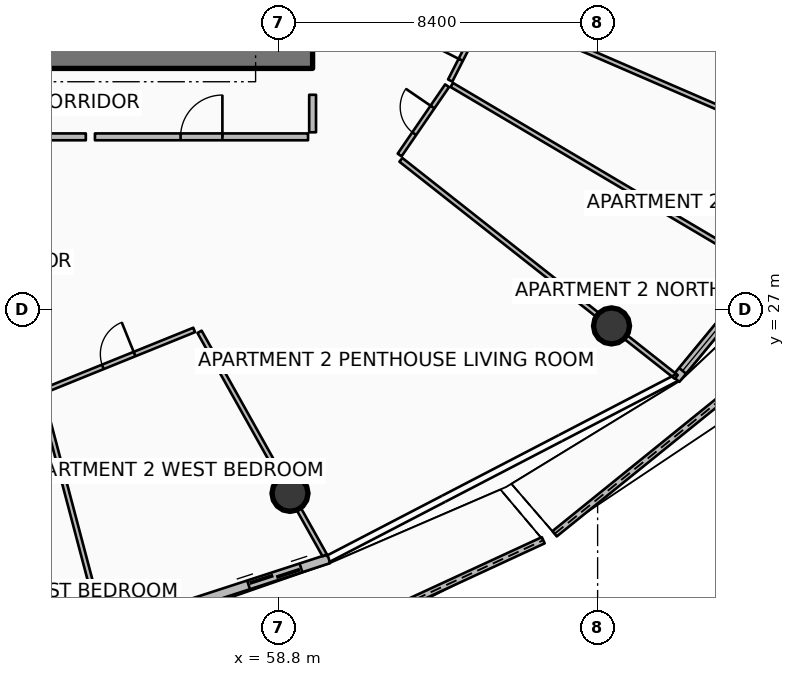
"""IFC4 building model, lengths in metres.
Left out: names, types, materials, properties, quantities, classifications, styles, units other than length and angle.
Written with IfcOpenShell. Run it as: python <this file> out.ifc"""

import sys

from ifc_helpers import new_model, si_unit, direction, frame, frame_2d, origin, origin_2d, place, context, subcontext, project, spatial, polyline, rectangle, circle, outline, extrude, element, fill, save


model = new_model("IFC4")
c1 = context("Model", 3, precision=1e-05, world=origin(), true_north=direction((0.0, 1.0)))
c2 = subcontext(c1, "Body", "Model", "MODEL_VIEW")
j1 = project(units=[si_unit("LENGTHUNIT", "METRE"), si_unit("PLANEANGLEUNIT", "RADIAN")], contexts=[c1])
p1 = place(None, origin())
s1 = spatial("IfcSite", under=j1, at=p1, CompositionType="ELEMENT")
p2 = place(p1, origin())
s2 = spatial("IfcBuilding", under=s1, at=p2, CompositionType="ELEMENT")
p3 = place(p2, frame((0.0, 0.0, 267.5)))
s3 = spatial("IfcBuildingStorey", under=s2, at=p3, CompositionType="ELEMENT", Elevation=267.5)
p4 = place(p3, frame((49.95, 33.675, 0.0), z_axis=(0.0, 0.0, 1.0), x_axis=(1.0, 0.0, 0.0)))
e1 = element("IfcWall", 1, at=p4, inside=s3, PredefinedType="SHEAR", context=c2, shape_type="SweptSolid", body=[
    extrude(rectangle(XDim=9.75, YDim=0.65, at=frame_2d((4.875, 0.0))), origin(), (0.0, 0.0, 1.0), 3.85),
])
for number, where, z_axis, x_axis in (
    (2, (59.105, 22.17, 0.0), (0.0, 0.0, 1.0), (1.0, 0.0, 0.0)),
    (3, (67.566, 26.575, 0.0), (0.0, 0.0, 1.0), (1.0, 0.0, 0.0)),
):
    element("IfcColumn", number, at=place(p3, frame(where, z_axis=z_axis, x_axis=x_axis)), inside=s3, PredefinedType="COLUMN", context=c2, shape_type="SweptSolid", body=[
        extrude(circle(Radius=0.475, at=origin_2d()), origin(), (0.0, 0.0, 1.0), 3.59),
    ])
p5 = place(p3, frame((56.379, 16.598, 0.0), z_axis=(0.0, 0.0, 1.0), x_axis=(0.907848132744, 0.419299138888, 0.0)))
e4 = element("IfcWall", 4, at=p5, inside=s3, PredefinedType="PARAPET", context=c2, shape_type="SweptSolid", body=[
    extrude(outline(polyline([(0.0, 0.0), (10.344, 0.0), (10.344, 1.233), (5.172, 1.418), (0.0, 1.632), (0.0, 0.0)])), frame((0.0, 0.09, 0.0), z_axis=(0.0, -1.0, 0.0), x_axis=(1.0, 0.0, 0.0)), (0.0, 0.0, 1.0), 0.18),
])
p6 = place(p3, frame((66.067, 21.105, 0.0), z_axis=(0.0, 0.0, 1.0), x_axis=(0.777688536298, 0.628649775718, 0.0)))
e5 = element("IfcWall", 5, at=p6, inside=s3, PredefinedType="PARAPET", context=c2, shape_type="SweptSolid", body=[
    extrude(outline(polyline([(0.0, 0.0), (11.285, 0.0), (11.285, 1.148), (5.642, 1.127), (0.0, 1.224), (0.0, 0.0)])), frame((0.0, 0.09, 0.0), z_axis=(0.0, -1.0, 0.0), x_axis=(1.0, 0.0, 0.0)), (0.0, 0.0, 1.0), 0.18),
])
p7 = place(p3, frame((50.858, 17.436, 0.0), z_axis=(0.0, 0.0, 1.0), x_axis=(0.951055974609, 0.309018661507, 0.0)))
e6 = element("IfcWall", 6, at=p7, inside=s3, PredefinedType="SOLIDWALL", context=c2, shape_type="SweptSolid", body=[
    extrude(rectangle(XDim=9.745, YDim=0.24, at=frame_2d((4.873, 0.0))), origin(), (0.0, 0.0, 1.0), 2.54),
])
p8 = place(p7, frame((7.525, 0.0, 0.0)))
e7 = element("IfcOpeningElement", 7, at=p8, cuts=e6, PredefinedType="OPENING", context=c2, shape_type="SweptSolid", body=[
    extrude(rectangle(XDim=1.45, YDim=2.15, at=frame_2d((0.725, 1.075))), frame((0.0, 0.13, 0.0), z_axis=(0.0, -1.0, 0.0), x_axis=(1.0, 0.0, 0.0)), (0.0, 0.0, 1.0), 0.26),
])
p9 = place(p7, frame((0.28, 0.0, 0.65)))
e8 = element("IfcOpeningElement", 8, at=p9, cuts=e6, PredefinedType="OPENING", context=c2, shape_type="SweptSolid", body=[
    extrude(rectangle(XDim=1.6, YDim=1.5, at=frame_2d((0.8, 0.75))), frame((0.0, 0.13, 0.0), z_axis=(0.0, -1.0, 0.0), x_axis=(1.0, 0.0, 0.0)), (0.0, 0.0, 1.0), 0.26),
])
p10 = place(p3, frame((69.258, 25.178, 0.0), z_axis=(0.0, 0.0, 1.0), x_axis=(0.636680093065, 0.771128043255, 0.0)))
e9 = element("IfcWall", 9, at=p10, inside=s3, PredefinedType="SOLIDWALL", context=c2, shape_type="SweptSolid", body=[
    extrude(rectangle(XDim=11.438, YDim=0.24, at=frame_2d((5.719, 0.0))), origin(), (0.0, 0.0, 1.0), 2.54),
])
p11 = place(p10, frame((9.218, 0.0, 0.0)))
e10 = element("IfcOpeningElement", 10, at=p11, cuts=e9, PredefinedType="OPENING", context=c2, shape_type="SweptSolid", body=[
    extrude(rectangle(XDim=1.45, YDim=2.15, at=frame_2d((0.725, 1.075))), frame((0.0, 0.13, 0.0), z_axis=(0.0, -1.0, 0.0), x_axis=(1.0, 0.0, 0.0)), (0.0, 0.0, 1.0), 0.26),
])
p12 = place(p10, frame((0.28, 0.0, 0.65)))
e11 = element("IfcOpeningElement", 11, at=p12, cuts=e9, PredefinedType="OPENING", context=c2, shape_type="SweptSolid", body=[
    extrude(rectangle(XDim=1.6, YDim=1.5, at=frame_2d((0.8, 0.75))), frame((0.0, 0.13, 0.0), z_axis=(0.0, -1.0, 0.0), x_axis=(1.0, 0.0, 0.0)), (0.0, 0.0, 1.0), 0.26),
])
p13 = place(p3, frame((53.972, 31.55, 0.0), z_axis=(0.0, 0.0, 1.0), x_axis=(1.0, 0.0, 0.0)))
e12 = element("IfcWall", 12, at=p13, inside=s3, PredefinedType="PARTITIONING", context=c2, shape_type="SweptSolid", body=[
    extrude(rectangle(XDim=5.608, YDim=0.18, at=frame_2d((2.804, 0.0))), origin(), (0.0, 0.0, 1.0), 2.957),
])
p14 = place(p13, frame((2.254, 0.0, 0.0)))
e13 = element("IfcOpeningElement", 13, at=p14, cuts=e12, PredefinedType="OPENING", context=c2, shape_type="SweptSolid", body=[
    extrude(rectangle(XDim=1.1, YDim=2.1, at=frame_2d((0.55, 1.05))), frame((0.0, 0.1, 0.0), z_axis=(0.0, -1.0, 0.0), x_axis=(1.0, 0.0, 0.0)), (0.0, 0.0, 1.0), 0.2),
])
p15 = place(p3, frame((59.7, 31.67, 0.0), z_axis=(0.0, 0.0, 1.0), x_axis=(0.0, 1.0, 0.0)))
e14 = element("IfcWall", 14, at=p15, inside=s3, PredefinedType="PARTITIONING", context=c2, shape_type="SweptSolid", body=[
    extrude(rectangle(XDim=0.987, YDim=0.18, at=frame_2d((0.493, 0.0))), origin(), (0.0, 0.0, 1.0), 2.957),
])
p16 = place(p3, frame((49.357, 31.55, 0.0), z_axis=(0.0, 0.0, 1.0), x_axis=(1.0, 0.0, 0.0)))
e15 = element("IfcWall", 15, at=p16, inside=s3, PredefinedType="PARTITIONING", context=c2, shape_type="SweptSolid", body=[
    extrude(rectangle(XDim=4.376, YDim=0.18, at=frame_2d((2.188, 0.0))), origin(), (0.0, 0.0, 1.0), 2.957),
])
p17 = place(p3, frame((56.725, 26.42, 0.0), z_axis=(0.0, 0.0, 1.0), x_axis=(0.488624332812, -0.872494275846, 0.0)))
e16 = element("IfcWall", 16, at=p17, inside=s3, PredefinedType="PARTITIONING", context=c2, shape_type="SweptSolid", body=[
    extrude(rectangle(XDim=6.738, YDim=0.125, at=frame_2d((3.369, 0.0))), origin(), (0.0, 0.0, 1.0), 2.957),
])
p18 = place(p3, frame((52.56, 24.746, 0.0), z_axis=(0.0, 0.0, 1.0), x_axis=(0.255531000294, -0.966800862582, 0.0)))
e17 = element("IfcWall", 17, at=p18, inside=s3, PredefinedType="PARTITIONING", context=c2, shape_type="SweptSolid", body=[
    extrude(rectangle(XDim=6.311, YDim=0.125, at=frame_2d((3.155, 0.0))), origin(), (0.0, 0.0, 1.0), 3.03),
])
p19 = place(p3, frame((52.612, 24.863, 0.0), z_axis=(0.0, 0.0, 1.0), x_axis=(0.927015680649, 0.375022569762, 0.0)))
e18 = element("IfcWall", 18, at=p19, inside=s3, PredefinedType="PARTITIONING", context=c2, shape_type="SweptSolid", body=[
    extrude(rectangle(XDim=4.285, YDim=0.125, at=frame_2d((2.143, 0.0))), origin(), (0.0, 0.0, 1.0), 2.957),
])
p20 = place(p19, frame((1.692, 0.0, 0.0)))
e19 = element("IfcOpeningElement", 19, at=p20, cuts=e18, PredefinedType="OPENING", context=c2, shape_type="SweptSolid", body=[
    extrude(rectangle(XDim=0.9, YDim=2.08, at=frame_2d((0.45, 1.04))), frame((0.0, 0.073, 0.0), z_axis=(0.0, -1.0, 0.0), x_axis=(1.0, 0.0, 0.0)), (0.0, 0.0, 1.0), 0.145),
])
p21 = place(p3, frame((62.023, 30.945, 0.0), z_axis=(0.0, 0.0, 1.0), x_axis=(0.785322102606, -0.619087388952, 0.0)))
e20 = element("IfcWall", 20, at=p21, inside=s3, PredefinedType="PARTITIONING", context=c2, shape_type="SweptSolid", body=[
    extrude(rectangle(XDim=9.228, YDim=0.125, at=frame_2d((4.614, 0.0))), origin(), (0.0, 0.0, 1.0), 2.957),
])
p22 = place(p3, frame((63.362, 32.915, 0.0), z_axis=(0.0, 0.0, 1.0), x_axis=(0.860726173163, -0.509068222178, 0.0)))
e21 = element("IfcWall", 21, at=p22, inside=s3, PredefinedType="PARTITIONING", context=c2, shape_type="SweptSolid", body=[
    extrude(rectangle(XDim=9.464, YDim=0.125, at=frame_2d((4.732, 0.0))), origin(), (0.0, 0.0, 1.0), 3.03),
])
p23 = place(p3, frame((64.379, 34.912, 0.0), z_axis=(0.0, 0.0, 1.0), x_axis=(0.917754922423, -0.397147204912, 0.0)))
e22 = element("IfcWall", 22, at=p23, inside=s3, PredefinedType="PARTITIONING", context=c2, shape_type="SweptSolid", body=[
    extrude(rectangle(XDim=10.243, YDim=0.125, at=frame_2d((5.122, 0.0))), origin(), (0.0, 0.0, 1.0), 3.03),
])
p24 = place(p3, frame((61.99, 31.073, 0.0), z_axis=(0.0, 0.0, 1.0), x_axis=(0.565365127096, 0.824840756185, 0.0)))
e23 = element("IfcWall", 23, at=p24, inside=s3, PredefinedType="PARTITIONING", context=c2, shape_type="SweptSolid", body=[
    extrude(rectangle(XDim=2.209, YDim=0.125, at=frame_2d((1.104, 0.0))), origin(), (0.0, 0.0, 1.0), 2.957),
])
p25 = place(p24, frame((0.68, 0.0, 0.0)))
e24 = element("IfcOpeningElement", 24, at=p25, cuts=e23, PredefinedType="OPENING", context=c2, shape_type="SweptSolid", body=[
    extrude(rectangle(XDim=0.85, YDim=2.06, at=frame_2d((0.425, 1.03))), frame((0.0, 0.073, 0.0), z_axis=(0.0, -1.0, 0.0), x_axis=(1.0, 0.0, 0.0)), (0.0, 0.0, 1.0), 0.145),
])
p26 = place(p3, frame((63.321, 33.032, 0.0), z_axis=(0.0, 0.0, 1.0), x_axis=(0.453994690579, 0.891004388837, 0.0)))
e25 = element("IfcWall", 25, at=p26, inside=s3, PredefinedType="PARTITIONING", context=c2, shape_type="SweptSolid", body=[
    extrude(rectangle(XDim=2.07, YDim=0.125, at=frame_2d((1.035, 0.0))), origin(), (0.0, 0.0, 1.0), 3.03),
])
p27 = place(p26, frame((0.61, 0.0, 0.0)))
e26 = element("IfcOpeningElement", 26, at=p27, cuts=e25, PredefinedType="OPENING", context=c2, shape_type="SweptSolid", body=[
    extrude(rectangle(XDim=0.85, YDim=2.06, at=frame_2d((0.425, 1.03))), frame((0.0, 0.073, 0.0), z_axis=(0.0, -1.0, 0.0), x_axis=(1.0, 0.0, 0.0)), (0.0, 0.0, 1.0), 0.145),
])
p28 = place(p8, origin())
e27 = element("IfcDoor", 27, at=p28, inside=s3, OperationType="DOUBLE_DOOR_SLIDING", PredefinedType="DOOR", context=c2, shape_type="SweptSolid", body=[
    extrude(rectangle(XDim=1.45, YDim=2.15, at=frame_2d((0.725, 1.075))), frame((0.0, 0.025, 0.0), z_axis=(0.0, -1.0, 0.0), x_axis=(1.0, 0.0, 0.0)), (0.0, 0.0, 1.0), 0.05),
])
fill(e7, e27)
p29 = place(p12, origin())
e28 = element("IfcWindow", 28, at=p29, inside=s3, PartitioningType="SINGLE_PANEL", PredefinedType="WINDOW", context=c2, shape_type="SweptSolid", body=[
    extrude(rectangle(XDim=1.6, YDim=1.5, at=frame_2d((0.8, 0.75))), frame((0.0, 0.03, 0.0), z_axis=(0.0, -1.0, 0.0), x_axis=(1.0, 0.0, 0.0)), (0.0, 0.0, 1.0), 0.06),
])
fill(e11, e28)
p30 = place(p14, origin())
e29 = element("IfcDoor", 29, at=p30, inside=s3, OperationType="SINGLE_SWING_RIGHT", PredefinedType="DOOR", context=c2, shape_type="SweptSolid", body=[
    extrude(rectangle(XDim=1.1, YDim=2.1, at=frame_2d((0.55, 1.05))), frame((0.0, 0.025, 0.0), z_axis=(0.0, -1.0, 0.0), x_axis=(1.0, 0.0, 0.0)), (0.0, 0.0, 1.0), 0.05),
])
fill(e13, e29)
p31 = place(p20, origin())
e30 = element("IfcDoor", 30, at=p31, inside=s3, OperationType="SINGLE_SWING_RIGHT", PredefinedType="DOOR", context=c2, shape_type="SweptSolid", body=[
    extrude(rectangle(XDim=0.9, YDim=2.08, at=frame_2d((0.45, 1.04))), frame((0.0, 0.025, 0.0), z_axis=(0.0, -1.0, 0.0), x_axis=(1.0, 0.0, 0.0)), (0.0, 0.0, 1.0), 0.05),
])
fill(e19, e30)
p32 = place(p25, origin())
e31 = element("IfcDoor", 31, at=p32, inside=s3, OperationType="SINGLE_SWING_RIGHT", PredefinedType="DOOR", context=c2, shape_type="SweptSolid", body=[
    extrude(rectangle(XDim=0.85, YDim=2.06, at=frame_2d((0.425, 1.03))), frame((0.0, 0.025, 0.0), z_axis=(0.0, -1.0, 0.0), x_axis=(1.0, 0.0, 0.0)), (0.0, 0.0, 1.0), 0.05),
])
fill(e24, e31)
p33 = place(p27, origin())
e32 = element("IfcDoor", 32, at=p33, inside=s3, OperationType="SINGLE_SWING_LEFT", PredefinedType="DOOR", context=c2, shape_type="SweptSolid", body=[
    extrude(rectangle(XDim=0.85, YDim=2.06, at=frame_2d((0.425, 1.03))), frame((0.0, 0.025, 0.0), z_axis=(0.0, -1.0, 0.0), x_axis=(1.0, 0.0, 0.0)), (0.0, 0.0, 1.0), 0.05),
])
fill(e26, e32)
save(model, sys.argv[1])
